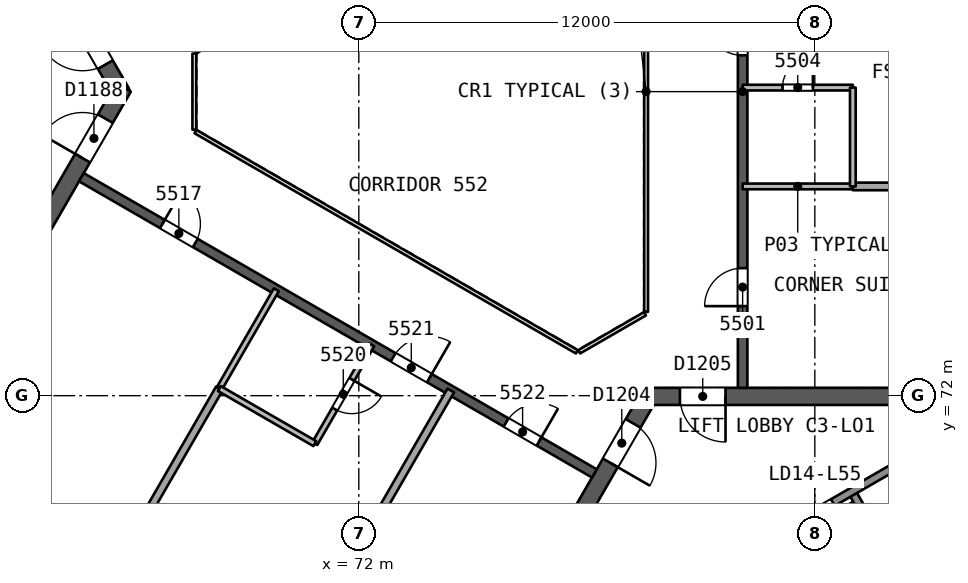
"""IFC4 building model, lengths in metres.
Left out: names, types, materials, properties, quantities, classifications, styles, units other than length and angle.
Written with IfcOpenShell. Run it as: python <this file> out.ifc"""

import sys

from ifc_helpers import new_model, si_unit, direction, frame, frame_2d, origin, place, context, subcontext, project, spatial, rectangle, extrude, element, fill, save


model = new_model("IFC4")
c1 = context("Model", 3, precision=1e-05, world=origin(), true_north=direction((0.0, 1.0)))
c2 = subcontext(c1, "Body", "Model", "MODEL_VIEW")
j1 = project(units=[si_unit("LENGTHUNIT", "METRE"), si_unit("PLANEANGLEUNIT", "RADIAN")], contexts=[c1])
p1 = place(None, origin())
s1 = spatial("IfcSite", under=j1, at=p1, CompositionType="ELEMENT")
p2 = place(p1, origin())
s2 = spatial("IfcBuilding", under=s1, at=p2, CompositionType="ELEMENT")
p3 = place(p2, frame((0.0, 0.0, 224.3)))
s3 = spatial("IfcBuildingStorey", under=s2, at=p3, CompositionType="ELEMENT", Elevation=224.3)
p4 = place(p3, frame((65.74, 80.0, 0.0), z_axis=(0.0, 0.0, 1.0), x_axis=(-0.499991857942, 0.866030104553, 0.0)))
e1 = element("IfcWall", 1, at=p4, inside=s3, PredefinedType="SHEAR", context=c2, shape_type="SweptSolid", body=[
    extrude(rectangle(XDim=10.25, YDim=0.45, at=frame_2d((5.125, 0.0))), origin(), (0.0, 0.0, 1.0), 3.7),
])
p5 = place(p4, frame((0.82, 0.0, 0.0)))
e2 = element("IfcOpeningElement", 2, at=p5, cuts=e1, PredefinedType="OPENING", context=c2, shape_type="SweptSolid", body=[
    extrude(rectangle(XDim=1.2, YDim=2.1, at=frame_2d((0.6, 1.05))), frame((0.0, 0.235, 0.0), z_axis=(0.0, -1.0, 0.0), x_axis=(1.0, 0.0, 0.0)), (0.0, 0.0, 1.0), 0.471),
])
p6 = place(p3, frame((60.728, 71.318, 0.0), z_axis=(0.0, 0.0, 1.0), x_axis=(0.500012416173, 0.866018235185, 0.0)))
e3 = element("IfcWall", 3, at=p6, inside=s3, PredefinedType="SHEAR", context=c2, shape_type="SweptSolid", body=[
    extrude(rectangle(XDim=10.155, YDim=0.45, at=frame_2d((5.078, 0.0))), origin(), (0.0, 0.0, 1.0), 3.7),
])
p7 = place(p6, frame((8.005, 0.0, 0.0)))
e4 = element("IfcOpeningElement", 4, at=p7, cuts=e3, PredefinedType="OPENING", context=c2, shape_type="SweptSolid", body=[
    extrude(rectangle(XDim=1.2, YDim=2.1, at=frame_2d((0.6, 1.05))), frame((0.0, 0.235, 0.0), z_axis=(0.0, -1.0, 0.0), x_axis=(1.0, 0.0, 0.0)), (0.0, 0.0, 1.0), 0.471),
])
p8 = place(p3, frame((79.63, 71.981, 0.0), z_axis=(0.0, 0.0, 1.0), x_axis=(-0.500002171595, -0.86602415001, 0.0)))
e5 = element("IfcWall", 5, at=p8, inside=s3, PredefinedType="SHEAR", context=c2, shape_type="SweptSolid", body=[
    extrude(rectangle(XDim=10.25, YDim=0.45, at=frame_2d((5.125, 0.0))), origin(), (0.0, 0.0, 1.0), 3.7),
])
p9 = place(p8, frame((0.82, 0.0, 0.0)))
e6 = element("IfcOpeningElement", 6, at=p9, cuts=e5, PredefinedType="OPENING", context=c2, shape_type="SweptSolid", body=[
    extrude(rectangle(XDim=1.2, YDim=2.1, at=frame_2d((0.6, 1.05))), frame((0.0, 0.235, 0.0), z_axis=(0.0, -1.0, 0.0), x_axis=(1.0, 0.0, 0.0)), (0.0, 0.0, 1.0), 0.471),
])
p10 = place(p3, frame((89.655, 71.981, 0.0), z_axis=(0.0, 0.0, 1.0), x_axis=(-1.0, 0.0, 0.0)))
e7 = element("IfcWall", 7, at=p10, inside=s3, PredefinedType="SHEAR", context=c2, shape_type="SweptSolid", body=[
    extrude(rectangle(XDim=10.155, YDim=0.45, at=frame_2d((5.078, 0.0))), origin(), (0.0, 0.0, 1.0), 3.7),
])
p11 = place(p10, frame((8.005, 0.0, 0.0)))
e8 = element("IfcOpeningElement", 8, at=p11, cuts=e7, PredefinedType="OPENING", context=c2, shape_type="SweptSolid", body=[
    extrude(rectangle(XDim=1.2, YDim=2.1, at=frame_2d((0.6, 1.05))), frame((0.0, 0.235, 0.0), z_axis=(0.0, -1.0, 0.0), x_axis=(1.0, 0.0, 0.0)), (0.0, 0.0, 1.0), 0.471),
])
p12 = place(p3, frame((82.1, 72.206, 0.0), z_axis=(0.0, 0.0, 1.0), x_axis=(0.0, 1.0, 0.0)))
e9 = element("IfcWall", 9, at=p12, inside=s3, PredefinedType="SHEAR", context=c2, shape_type="SweptSolid", body=[
    extrude(rectangle(XDim=15.588, YDim=0.25, at=frame_2d((7.794, 0.0))), origin(), (0.0, 0.0, 1.0), 3.3),
])
p13 = place(p12, frame((2.15, 0.0, 0.0)))
e10 = element("IfcOpeningElement", 10, at=p13, cuts=e9, PredefinedType="OPENING", context=c2, shape_type="SweptSolid", body=[
    extrude(rectangle(XDim=1.0, YDim=2.1, at=frame_2d((0.5, 1.05))), frame((0.0, 0.135, 0.0), z_axis=(0.0, -1.0, 0.0), x_axis=(1.0, 0.0, 0.0)), (0.0, 0.0, 1.0), 0.271),
])
p14 = place(p12, frame((8.75, 0.0, 0.0)))
e11 = element("IfcOpeningElement", 11, at=p14, cuts=e9, PredefinedType="OPENING", context=c2, shape_type="SweptSolid", body=[
    extrude(rectangle(XDim=1.0, YDim=2.1, at=frame_2d((0.5, 1.05))), frame((0.0, 0.135, 0.0), z_axis=(0.0, -1.0, 0.0), x_axis=(1.0, 0.0, 0.0)), (0.0, 0.0, 1.0), 0.271),
])
p15 = place(p12, frame((12.594, 0.0, 0.0)))
e12 = element("IfcOpeningElement", 12, at=p15, cuts=e9, PredefinedType="OPENING", context=c2, shape_type="SweptSolid", body=[
    extrude(rectangle(XDim=1.0, YDim=2.1, at=frame_2d((0.5, 1.05))), frame((0.0, 0.135, 0.0), z_axis=(0.0, -1.0, 0.0), x_axis=(1.0, 0.0, 0.0)), (0.0, 0.0, 1.0), 0.271),
])
p16 = place(p3, frame((64.7, 77.748, 0.0), z_axis=(0.0, 0.0, 1.0), x_axis=(0.866026492143, -0.499998114903, 0.0)))
e13 = element("IfcWall", 13, at=p16, inside=s3, PredefinedType="SHEAR", context=c2, shape_type="SweptSolid", body=[
    extrude(rectangle(XDim=15.588, YDim=0.25, at=frame_2d((7.794, 0.0))), origin(), (0.0, 0.0, 1.0), 3.3),
])
p17 = place(p16, frame((2.462, 0.0, 0.0)))
e14 = element("IfcOpeningElement", 14, at=p17, cuts=e13, PredefinedType="OPENING", context=c2, shape_type="SweptSolid", body=[
    extrude(rectangle(XDim=1.0, YDim=2.1, at=frame_2d((0.5, 1.05))), frame((0.0, 0.135, 0.0), z_axis=(0.0, -1.0, 0.0), x_axis=(1.0, 0.0, 0.0)), (0.0, 0.0, 1.0), 0.271),
])
p18 = place(p16, frame((9.474, 0.0, 0.0)))
e15 = element("IfcOpeningElement", 15, at=p18, cuts=e13, PredefinedType="OPENING", context=c2, shape_type="SweptSolid", body=[
    extrude(rectangle(XDim=1.1, YDim=2.1, at=frame_2d((0.55, 1.05))), frame((0.0, 0.135, 0.0), z_axis=(0.0, -1.0, 0.0), x_axis=(1.0, 0.0, 0.0)), (0.0, 0.0, 1.0), 0.271),
])
p19 = place(p16, frame((12.906, 0.0, 0.0)))
e16 = element("IfcOpeningElement", 16, at=p19, cuts=e13, PredefinedType="OPENING", context=c2, shape_type="SweptSolid", body=[
    extrude(rectangle(XDim=1.0, YDim=2.1, at=frame_2d((0.5, 1.05))), frame((0.0, 0.135, 0.0), z_axis=(0.0, -1.0, 0.0), x_axis=(1.0, 0.0, 0.0)), (0.0, 0.0, 1.0), 0.271),
])
p20 = place(p3, frame((92.428, 77.506, 0.0), z_axis=(0.0, 0.0, 1.0), x_axis=(-1.0, 0.0, 0.0)))
e17 = element("IfcWall", 17, at=p20, inside=s3, PredefinedType="PARTITIONING", context=c2, shape_type="SweptSolid", body=[
    extrude(rectangle(XDim=7.428, YDim=0.2, at=frame_2d((3.714, 0.0))), origin(), (0.0, 0.0, 1.0), 3.3),
])
p21 = place(p3, frame((85.0, 77.506, 0.0), z_axis=(0.0, 0.0, 1.0), x_axis=(-1.0, 0.0, 0.0)))
e18 = element("IfcWall", 18, at=p21, inside=s3, PredefinedType="PARTITIONING", context=c2, shape_type="SweptSolid", body=[
    extrude(rectangle(XDim=2.9, YDim=0.15, at=frame_2d((1.45, 0.0))), origin(), (0.0, 0.0, 1.0), 3.3),
])
p22 = place(p3, frame((82.1, 80.106, 0.0), z_axis=(0.0, 0.0, 1.0), x_axis=(1.0, 0.0, 0.0)))
e19 = element("IfcWall", 19, at=p22, inside=s3, PredefinedType="PARTITIONING", context=c2, shape_type="SweptSolid", body=[
    extrude(rectangle(XDim=2.9, YDim=0.15, at=frame_2d((1.45, 0.0))), origin(), (0.0, 0.0, 1.0), 3.3),
])
p23 = place(p22, frame((1.05, 0.0, 0.0)))
e20 = element("IfcOpeningElement", 20, at=p23, cuts=e19, PredefinedType="OPENING", context=c2, shape_type="SweptSolid", body=[
    extrude(rectangle(XDim=0.8, YDim=2.1, at=frame_2d((0.4, 1.05))), frame((0.0, 0.085, 0.0), z_axis=(0.0, -1.0, 0.0), x_axis=(1.0, 0.0, 0.0)), (0.0, 0.0, 1.0), 0.171),
])
p24 = place(p3, frame((85.0, 80.106, 0.0), z_axis=(0.0, 0.0, 1.0), x_axis=(0.0, -1.0, 0.0)))
e21 = element("IfcWall", 21, at=p24, inside=s3, PredefinedType="PARTITIONING", context=c2, shape_type="SweptSolid", body=[
    extrude(rectangle(XDim=2.6, YDim=0.15, at=frame_2d((1.3, 0.0))), origin(), (0.0, 0.0, 1.0), 3.3),
])
p25 = place(p3, frame((64.666, 65.842, 0.0), z_axis=(0.0, 0.0, 1.0), x_axis=(0.500019482754, 0.866014155119, 0.0)))
e22 = element("IfcWall", 22, at=p25, inside=s3, PredefinedType="PARTITIONING", context=c2, shape_type="SweptSolid", body=[
    extrude(rectangle(XDim=7.328, YDim=0.2, at=frame_2d((3.664, 0.0))), origin(), (0.0, 0.0, 1.0), 3.3),
])
p26 = place(p3, frame((68.33, 72.188, 0.0), z_axis=(0.0, 0.0, 1.0), x_axis=(0.499990139034, 0.866031096941, 0.0)))
e23 = element("IfcWall", 23, at=p26, inside=s3, PredefinedType="PARTITIONING", context=c2, shape_type="SweptSolid", body=[
    extrude(rectangle(XDim=3.0, YDim=0.15, at=frame_2d((1.5, 0.0))), origin(), (0.0, 0.0, 1.0), 3.3),
])
p27 = place(p3, frame((72.342, 73.336, 0.0), z_axis=(0.0, 0.0, 1.0), x_axis=(-0.50002537861, -0.866010750942, 0.0)))
e24 = element("IfcWall", 24, at=p27, inside=s3, PredefinedType="PARTITIONING", context=c2, shape_type="SweptSolid", body=[
    extrude(rectangle(XDim=3.0, YDim=0.15, at=frame_2d((1.5, 0.0))), origin(), (0.0, 0.0, 1.0), 3.3),
])
p28 = place(p27, frame((1.05, 0.0, 0.0)))
e25 = element("IfcOpeningElement", 25, at=p28, cuts=e24, PredefinedType="OPENING", context=c2, shape_type="SweptSolid", body=[
    extrude(rectangle(XDim=0.9, YDim=2.1, at=frame_2d((0.45, 1.05))), frame((0.0, 0.085, 0.0), z_axis=(0.0, -1.0, 0.0), x_axis=(1.0, 0.0, 0.0)), (0.0, 0.0, 1.0), 0.171),
])
p29 = place(p3, frame((70.842, 70.739, 0.0), z_axis=(0.0, 0.0, 1.0), x_axis=(-0.866032775405, 0.499987231761, 0.0)))
e26 = element("IfcWall", 26, at=p29, inside=s3, PredefinedType="PARTITIONING", context=c2, shape_type="SweptSolid", body=[
    extrude(rectangle(XDim=2.9, YDim=0.15, at=frame_2d((1.45, 0.0))), origin(), (0.0, 0.0, 1.0), 3.3),
])
p30 = place(p3, frame((69.256, 63.192, 0.0), z_axis=(0.0, 0.0, 1.0), x_axis=(0.499993230995, 0.866029311836, 0.0)))
e27 = element("IfcWall", 27, at=p30, inside=s3, PredefinedType="PARTITIONING", context=c2, shape_type="SweptSolid", body=[
    extrude(rectangle(XDim=10.328, YDim=0.2, at=frame_2d((5.164, 0.0))), origin(), (0.0, 0.0, 1.0), 3.3),
])
p31 = place(p3, frame((88.099, 52.141, 0.0), z_axis=(0.0, 0.0, 1.0), x_axis=(-0.86602584856, 0.499999229625, 0.0)))
e28 = element("IfcWall", 28, at=p31, inside=s3, PredefinedType="SOLIDWALL", context=c2, shape_type="SweptSolid", body=[
    extrude(rectangle(XDim=50.547, YDim=0.3, at=frame_2d((25.274, 0.0))), origin(), (0.0, 0.0, 1.0), 3.3),
])
p32 = place(p31, frame((23.294, 0.0, 0.0)))
e29 = element("IfcOpeningElement", 29, at=p32, cuts=e28, PredefinedType="OPENING", context=c2, shape_type="SweptSolid", body=[
    extrude(rectangle(XDim=2.4, YDim=2.4, at=frame_2d((1.2, 1.2))), frame((0.0, 0.161, 0.0), z_axis=(0.0, -1.0, 0.0), x_axis=(1.0, 0.0, 0.0)), (0.0, 0.0, 1.0), 0.321),
])
p33 = place(p31, frame((28.906, 0.0, 0.0)))
e30 = element("IfcOpeningElement", 30, at=p33, cuts=e28, PredefinedType="OPENING", context=c2, shape_type="SweptSolid", body=[
    extrude(rectangle(XDim=2.4, YDim=2.4, at=frame_2d((1.2, 1.2))), frame((0.0, 0.161, 0.0), z_axis=(0.0, -1.0, 0.0), x_axis=(1.0, 0.0, 0.0)), (0.0, 0.0, 1.0), 0.321),
])
p34 = place(p31, frame((39.328, 0.0, 0.0)))
e31 = element("IfcOpeningElement", 31, at=p34, cuts=e28, PredefinedType="OPENING", context=c2, shape_type="SweptSolid", body=[
    extrude(rectangle(XDim=2.4, YDim=2.4, at=frame_2d((1.2, 1.2))), frame((0.0, 0.161, 0.0), z_axis=(0.0, -1.0, 0.0), x_axis=(1.0, 0.0, 0.0)), (0.0, 0.0, 1.0), 0.321),
])
p35 = place(p31, frame((18.462, 0.0, 0.0)))
e32 = element("IfcOpeningElement", 32, at=p35, cuts=e28, PredefinedType="OPENING", context=c2, shape_type="SweptSolid", body=[
    extrude(rectangle(XDim=2.4, YDim=2.4, at=frame_2d((1.2, 1.2))), frame((0.0, 0.161, 0.0), z_axis=(0.0, -1.0, 0.0), x_axis=(1.0, 0.0, 0.0)), (0.0, 0.0, 1.0), 0.321),
])
p36 = place(p31, frame((8.771, 0.0, 0.0)))
e33 = element("IfcOpeningElement", 33, at=p36, cuts=e28, PredefinedType="OPENING", context=c2, shape_type="SweptSolid", body=[
    extrude(rectangle(XDim=2.4, YDim=2.4, at=frame_2d((1.2, 1.2))), frame((0.0, 0.161, 0.0), z_axis=(0.0, -1.0, 0.0), x_axis=(1.0, 0.0, 0.0)), (0.0, 0.0, 1.0), 0.321),
])
p37 = place(p3, frame((84.973, 69.477, 0.0), z_axis=(0.0, 0.0, 1.0), x_axis=(0.499996545922, -0.866027397988, 0.0)))
e34 = element("IfcWall", 34, at=p37, inside=s3, PredefinedType="SOLIDWALL", context=c2, shape_type="SweptSolid", body=[
    extrude(rectangle(XDim=2.75, YDim=0.2, at=frame_2d((1.375, 0.0))), origin(), (0.0, 0.0, 1.0), 3.3),
])
p38 = place(p3, frame((77.135, 64.952, 0.0), z_axis=(0.0, 0.0, 1.0), x_axis=(0.866031916153, 0.499988720078, 0.0)))
e35 = element("IfcWall", 35, at=p38, inside=s3, PredefinedType="SOLIDWALL", context=c2, shape_type="SweptSolid", body=[
    extrude(rectangle(XDim=11.35, YDim=0.2, at=frame_2d((5.675, 0.0))), origin(), (0.0, 0.0, 1.0), 3.3),
])
p39 = place(p38, frame((2.875, 0.0, 0.0)))
e36 = element("IfcOpeningElement", 36, at=p39, cuts=e35, PredefinedType="OPENING", context=c2, shape_type="SweptSolid", body=[
    extrude(rectangle(XDim=1.1, YDim=2.1, at=frame_2d((0.55, 1.05))), frame((0.0, 0.11, 0.0), z_axis=(0.0, -1.0, 0.0), x_axis=(1.0, 0.0, 0.0)), (0.0, 0.0, 1.0), 0.221),
])
p40 = place(p38, frame((5.125, 0.0, 0.0)))
e37 = element("IfcOpeningElement", 37, at=p40, cuts=e35, PredefinedType="OPENING", context=c2, shape_type="SweptSolid", body=[
    extrude(rectangle(XDim=1.1, YDim=2.1, at=frame_2d((0.55, 1.05))), frame((0.0, 0.11, 0.0), z_axis=(0.0, -1.0, 0.0), x_axis=(1.0, 0.0, 0.0)), (0.0, 0.0, 1.0), 0.221),
])
p41 = place(p38, frame((7.375, 0.0, 0.0)))
e38 = element("IfcOpeningElement", 38, at=p41, cuts=e35, PredefinedType="OPENING", context=c2, shape_type="SweptSolid", body=[
    extrude(rectangle(XDim=1.1, YDim=2.1, at=frame_2d((0.55, 1.05))), frame((0.0, 0.11, 0.0), z_axis=(0.0, -1.0, 0.0), x_axis=(1.0, 0.0, 0.0)), (0.0, 0.0, 1.0), 0.221),
])
for number, where, z_axis, x_axis in (
    (39, (79.56, 74.206, 0.0), (0.0, 0.0, 1.0), (0.0, 1.0, 0.0)),
    (40, (77.738, 86.846, 0.0), (0.0, 0.0, 1.0), (-0.866, -0.5, 0.0)),
):
    element("IfcWall", number, at=place(p3, frame(where, z_axis=z_axis, x_axis=x_axis)), inside=s3, PredefinedType="PARTITIONING", context=c2, shape_type="SweptSolid", body=[
        extrude(rectangle(XDim=11.588, YDim=0.1, at=frame_2d((5.794, 0.0))), origin(), (0.0, 0.0, 1.0), 3.3),
    ])
p42 = place(p3, frame((67.672, 81.0, 0.0), z_axis=(0.0, 0.0, 1.0), x_axis=(0.0, -1.0, 0.0)))
e41 = element("IfcWall", 41, at=p42, inside=s3, PredefinedType="PARTITIONING", context=c2, shape_type="SweptSolid", body=[
    extrude(rectangle(XDim=2.0, YDim=0.1, at=frame_2d((1.0, 0.0))), origin(), (0.0, 0.0, 1.0), 3.3),
])
p43 = place(p3, frame((67.702, 78.948, 0.0), z_axis=(0.0, 0.0, 1.0), x_axis=(0.866026658274, -0.499997827154, 0.0)))
e42 = element("IfcWall", 42, at=p43, inside=s3, PredefinedType="PARTITIONING", context=c2, shape_type="SweptSolid", body=[
    extrude(rectangle(XDim=11.588, YDim=0.1, at=frame_2d((5.794, 0.0))), origin(), (0.0, 0.0, 1.0), 3.3),
])
p44 = place(p3, frame((77.798, 73.154, 0.0), z_axis=(0.0, 0.0, 1.0), x_axis=(0.866041268327, 0.499972520799, 0.0)))
e43 = element("IfcWall", 43, at=p44, inside=s3, PredefinedType="PARTITIONING", context=c2, shape_type="SweptSolid", body=[
    extrude(rectangle(XDim=2.0, YDim=0.1, at=frame_2d((1.0, 0.0))), origin(), (0.0, 0.0, 1.0), 3.3),
])
p45 = place(p13, origin())
e44 = element("IfcDoor", 44, at=p45, inside=s3, OperationType="SINGLE_SWING_LEFT", PredefinedType="NOTDEFINED", context=c2, shape_type="SweptSolid", body=[
    extrude(rectangle(XDim=1.0, YDim=2.1, at=frame_2d((0.5, 1.05))), frame((0.0, 0.025, 0.0), z_axis=(0.0, -1.0, 0.0), x_axis=(1.0, 0.0, 0.0)), (0.0, 0.0, 1.0), 0.05),
])
fill(e10, e44)
p46 = place(p23, origin())
e45 = element("IfcDoor", 45, at=p46, inside=s3, OperationType="SINGLE_SWING_RIGHT", PredefinedType="NOTDEFINED", context=c2, shape_type="SweptSolid", body=[
    extrude(rectangle(XDim=0.8, YDim=2.1, at=frame_2d((0.4, 1.05))), frame((0.0, 0.025, 0.0), z_axis=(0.0, -1.0, 0.0), x_axis=(1.0, 0.0, 0.0)), (0.0, 0.0, 1.0), 0.05),
])
fill(e20, e45)
p47 = place(p14, origin())
e46 = element("IfcDoor", 46, at=p47, inside=s3, OperationType="SINGLE_SWING_RIGHT", PredefinedType="NOTDEFINED", context=c2, shape_type="SweptSolid", body=[
    extrude(rectangle(XDim=1.0, YDim=2.1, at=frame_2d((0.5, 1.05))), frame((0.0, 0.025, 0.0), z_axis=(0.0, -1.0, 0.0), x_axis=(1.0, 0.0, 0.0)), (0.0, 0.0, 1.0), 0.05),
])
fill(e11, e46)
p48 = place(p17, origin())
e47 = element("IfcDoor", 47, at=p48, inside=s3, OperationType="SINGLE_SWING_LEFT", PredefinedType="NOTDEFINED", context=c2, shape_type="SweptSolid", body=[
    extrude(rectangle(XDim=1.0, YDim=2.1, at=frame_2d((0.5, 1.05))), frame((0.0, 0.025, 0.0), z_axis=(0.0, -1.0, 0.0), x_axis=(1.0, 0.0, 0.0)), (0.0, 0.0, 1.0), 0.05),
])
fill(e14, e47)
p49 = place(p28, origin())
e48 = element("IfcDoor", 48, at=p49, inside=s3, OperationType="SINGLE_SWING_LEFT", PredefinedType="NOTDEFINED", context=c2, shape_type="SweptSolid", body=[
    extrude(rectangle(XDim=0.9, YDim=2.1, at=frame_2d((0.45, 1.05))), frame((0.0, 0.025, 0.0), z_axis=(0.0, -1.0, 0.0), x_axis=(1.0, 0.0, 0.0)), (0.0, 0.0, 1.0), 0.05),
])
fill(e25, e48)
p50 = place(p18, origin())
e49 = element("IfcDoor", 49, at=p50, inside=s3, OperationType="SINGLE_SWING_RIGHT", PredefinedType="NOTDEFINED", context=c2, shape_type="SweptSolid", body=[
    extrude(rectangle(XDim=1.1, YDim=2.1, at=frame_2d((0.55, 1.05))), frame((0.0, 0.025, 0.0), z_axis=(0.0, -1.0, 0.0), x_axis=(1.0, 0.0, 0.0)), (0.0, 0.0, 1.0), 0.05),
])
fill(e15, e49)
p51 = place(p19, origin())
e50 = element("IfcDoor", 50, at=p51, inside=s3, OperationType="SINGLE_SWING_RIGHT", PredefinedType="NOTDEFINED", context=c2, shape_type="SweptSolid", body=[
    extrude(rectangle(XDim=1.0, YDim=2.1, at=frame_2d((0.5, 1.05))), frame((0.0, 0.025, 0.0), z_axis=(0.0, -1.0, 0.0), x_axis=(1.0, 0.0, 0.0)), (0.0, 0.0, 1.0), 0.05),
])
fill(e16, e50)
p52 = place(p5, origin())
e51 = element("IfcDoor", 51, at=p52, inside=s3, OperationType="SINGLE_SWING_RIGHT", PredefinedType="NOTDEFINED", context=c2, shape_type="SweptSolid", body=[
    extrude(rectangle(XDim=1.2, YDim=2.1, at=frame_2d((0.6, 1.05))), frame((0.0, 0.025, 0.0), z_axis=(0.0, -1.0, 0.0), x_axis=(1.0, 0.0, 0.0)), (0.0, 0.0, 1.0), 0.05),
])
fill(e2, e51)
p53 = place(p7, origin())
e52 = element("IfcDoor", 52, at=p53, inside=s3, OperationType="SINGLE_SWING_LEFT", PredefinedType="NOTDEFINED", context=c2, shape_type="SweptSolid", body=[
    extrude(rectangle(XDim=1.2, YDim=2.1, at=frame_2d((0.6, 1.05))), frame((0.0, 0.025, 0.0), z_axis=(0.0, -1.0, 0.0), x_axis=(1.0, 0.0, 0.0)), (0.0, 0.0, 1.0), 0.05),
])
fill(e4, e52)
p54 = place(p9, origin())
e53 = element("IfcDoor", 53, at=p54, inside=s3, OperationType="SINGLE_SWING_RIGHT", PredefinedType="NOTDEFINED", context=c2, shape_type="SweptSolid", body=[
    extrude(rectangle(XDim=1.2, YDim=2.1, at=frame_2d((0.6, 1.05))), frame((0.0, 0.025, 0.0), z_axis=(0.0, -1.0, 0.0), x_axis=(1.0, 0.0, 0.0)), (0.0, 0.0, 1.0), 0.05),
])
fill(e6, e53)
p55 = place(p11, origin())
e54 = element("IfcDoor", 54, at=p55, inside=s3, OperationType="SINGLE_SWING_LEFT", PredefinedType="NOTDEFINED", context=c2, shape_type="SweptSolid", body=[
    extrude(rectangle(XDim=1.2, YDim=2.1, at=frame_2d((0.6, 1.05))), frame((0.0, 0.025, 0.0), z_axis=(0.0, -1.0, 0.0), x_axis=(1.0, 0.0, 0.0)), (0.0, 0.0, 1.0), 0.05),
])
fill(e8, e54)
p56 = place(p41, origin())
e55 = element("IfcDoor", 55, at=p56, inside=s3, OperationType="SLIDING_TO_LEFT", PredefinedType="NOTDEFINED", context=c2, shape_type="SweptSolid", body=[
    extrude(rectangle(XDim=1.1, YDim=2.1, at=frame_2d((0.55, 1.05))), frame((0.0, 0.025, 0.0), z_axis=(0.0, -1.0, 0.0), x_axis=(1.0, 0.0, 0.0)), (0.0, 0.0, 1.0), 0.05),
])
fill(e38, e55)
save(model, sys.argv[1])
